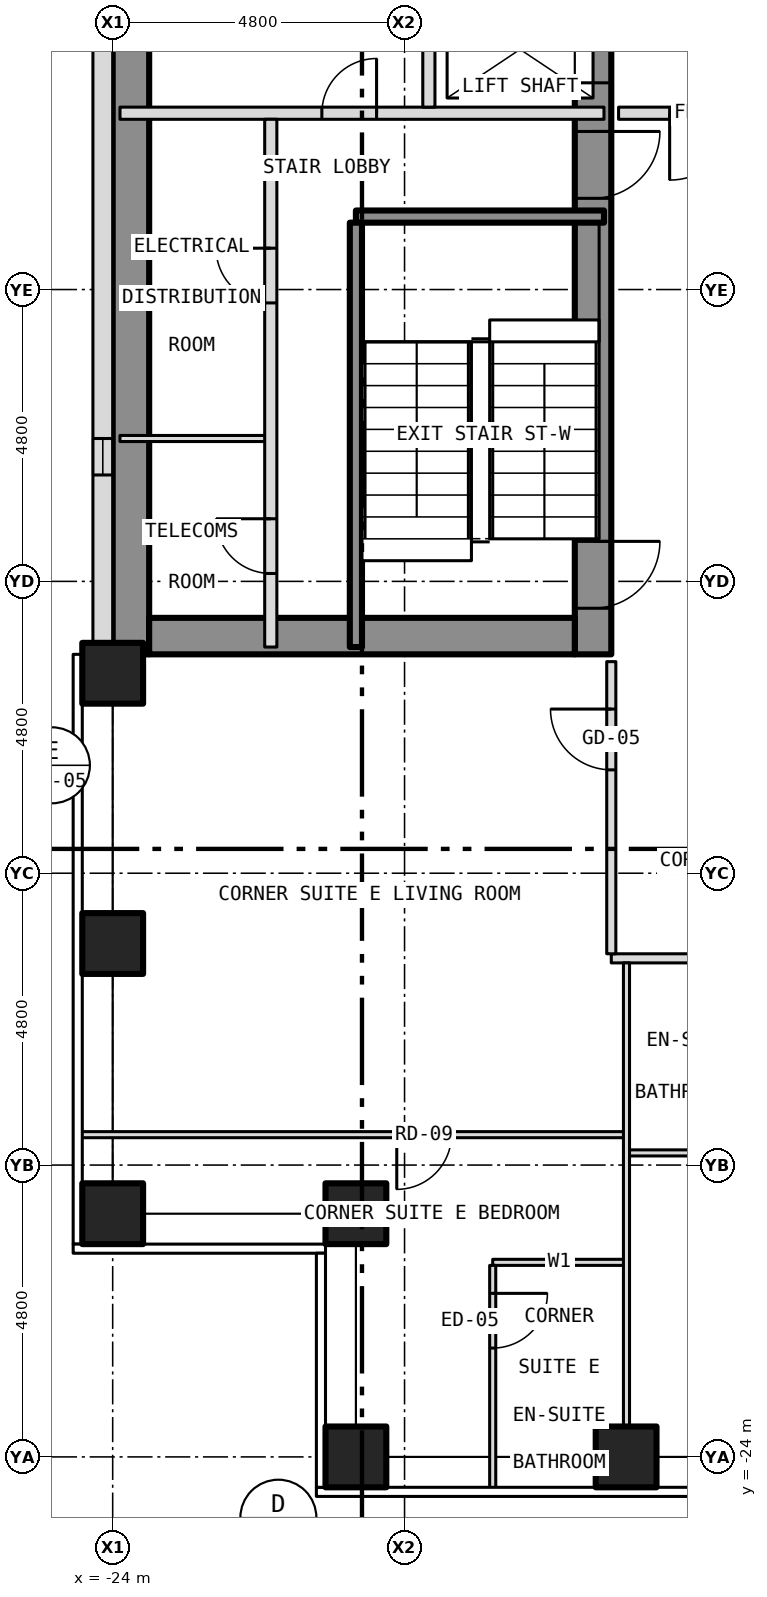
"""IFC4 building model, lengths in metres.
Left out: names, types, materials, properties, quantities, classifications, styles, units other than length and angle.
Written with IfcOpenShell. Run it as: python <this file> out.ifc"""

import sys

from ifc_helpers import new_model, si_unit, direction, frame, frame_2d, origin, origin_2d, place, context, subcontext, project, spatial, rectangle, hollow_rectangle, extrude, element, fill, save


model = new_model("IFC4")
c1 = context("Model", 3, precision=1e-05, world=origin(), true_north=direction((0.0, 1.0)))
c2 = subcontext(c1, "Body", "Model", "MODEL_VIEW")
j1 = project(units=[si_unit("LENGTHUNIT", "METRE"), si_unit("PLANEANGLEUNIT", "RADIAN")], contexts=[c1])
p1 = place(None, origin())
s1 = spatial("IfcSite", under=j1, at=p1, CompositionType="ELEMENT")
p2 = place(p1, origin())
s2 = spatial("IfcBuilding", under=s1, at=p2, CompositionType="ELEMENT")
p3 = place(p2, frame((0.0, 0.0, 81.0)))
s3 = spatial("IfcBuildingStorey", under=s2, at=p3, CompositionType="ELEMENT", Elevation=81.0)
for number, where, z_axis, x_axis in (
    (1, (-20.0, -24.0, -0.15), (0.0, 0.0, 1.0), (1.0, 0.0, 0.0)),
    (2, (-15.556, -24.0, -0.15), (0.0, 0.0, 1.0), (1.0, 0.0, 0.0)),
    (3, (-24.0, -20.0, -0.15), (0.0, 0.0, 1.0), (1.0, 0.0, 0.0)),
    (4, (-24.0, -15.556, -0.15), (0.0, 0.0, 1.0), (1.0, 0.0, 0.0)),
    (5, (-24.0, -11.111, -0.15), (0.0, 0.0, 1.0), (1.0, 0.0, 0.0)),
    (6, (-20.0, -20.0, -0.15), (0.0, 0.0, 1.0), (1.0, 0.0, 0.0)),
):
    element("IfcColumn", number, at=place(p3, frame(where, z_axis=z_axis, x_axis=x_axis)), inside=s3, PredefinedType="COLUMN", context=c2, shape_type="SweptSolid", body=[
        extrude(hollow_rectangle(XDim=1.0, YDim=1.0, WallThickness=0.06, at=origin_2d()), origin(), (0.0, 0.0, 1.0), 3.35),
    ])
p4 = place(p3, frame((-16.1, -10.8, 0.0), z_axis=(0.0, 0.0, 1.0), x_axis=(0.0, 1.0, 0.0)))
e7 = element("IfcWall", 7, at=p4, inside=s3, PredefinedType="SHEAR", context=c2, shape_type="SweptSolid", body=[
    extrude(rectangle(XDim=21.6, YDim=0.6, at=frame_2d((10.8, 0.0))), origin(), (0.0, 0.0, 1.0), 2.9),
])
p5 = place(p4, frame((9.4, 0.0, 0.0)))
e8 = element("IfcOpeningElement", 8, at=p5, cuts=e7, PredefinedType="OPENING", context=c2, shape_type="SweptSolid", body=[
    extrude(rectangle(XDim=1.1, YDim=2.1, at=frame_2d((0.55, 1.05))), frame((0.0, 0.312, 0.0), z_axis=(0.0, -1.0, 0.0), x_axis=(1.0, 0.0, 0.0)), (0.0, 0.0, 1.0), 0.624),
])
p6 = place(p4, frame((11.5, 0.0, 0.0)))
e9 = element("IfcOpeningElement", 9, at=p6, cuts=e7, PredefinedType="OPENING", context=c2, shape_type="SweptSolid", body=[
    extrude(rectangle(XDim=1.1, YDim=2.1, at=frame_2d((0.55, 1.05))), frame((0.0, 0.312, 0.0), z_axis=(0.0, -1.0, 0.0), x_axis=(1.0, 0.0, 0.0)), (0.0, 0.0, 1.0), 0.624),
])
p7 = place(p4, frame((13.6, 0.0, 0.0)))
e10 = element("IfcOpeningElement", 10, at=p7, cuts=e7, PredefinedType="OPENING", context=c2, shape_type="SweptSolid", body=[
    extrude(rectangle(XDim=1.1, YDim=2.1, at=frame_2d((0.55, 1.05))), frame((0.0, 0.312, 0.0), z_axis=(0.0, -1.0, 0.0), x_axis=(1.0, 0.0, 0.0)), (0.0, 0.0, 1.0), 0.624),
])
p8 = place(p4, frame((15.7, 0.0, 0.0)))
e11 = element("IfcOpeningElement", 11, at=p8, cuts=e7, PredefinedType="OPENING", context=c2, shape_type="SweptSolid", body=[
    extrude(rectangle(XDim=1.1, YDim=2.1, at=frame_2d((0.55, 1.05))), frame((0.0, 0.312, 0.0), z_axis=(0.0, -1.0, 0.0), x_axis=(1.0, 0.0, 0.0)), (0.0, 0.0, 1.0), 0.624),
])
p9 = place(p4, frame((17.8, 0.0, 0.0)))
e12 = element("IfcOpeningElement", 12, at=p9, cuts=e7, PredefinedType="OPENING", context=c2, shape_type="SweptSolid", body=[
    extrude(rectangle(XDim=1.1, YDim=2.1, at=frame_2d((0.55, 1.05))), frame((0.0, 0.312, 0.0), z_axis=(0.0, -1.0, 0.0), x_axis=(1.0, 0.0, 0.0)), (0.0, 0.0, 1.0), 0.624),
])
p10 = place(p4, frame((0.758, 0.0, 0.0)))
e13 = element("IfcOpeningElement", 13, at=p10, cuts=e7, PredefinedType="OPENING", context=c2, shape_type="SweptSolid", body=[
    extrude(rectangle(XDim=1.1, YDim=2.1, at=frame_2d((0.55, 1.05))), frame((0.0, 0.312, 0.0), z_axis=(0.0, -1.0, 0.0), x_axis=(1.0, 0.0, 0.0)), (0.0, 0.0, 1.0), 0.624),
])
p11 = place(p4, frame((7.5, 0.0, 0.0)))
e14 = element("IfcOpeningElement", 14, at=p11, cuts=e7, PredefinedType="OPENING", context=c2, shape_type="SweptSolid", body=[
    extrude(rectangle(XDim=1.1, YDim=2.1, at=frame_2d((0.55, 1.05))), frame((0.0, 0.312, 0.0), z_axis=(0.0, -1.0, 0.0), x_axis=(1.0, 0.0, 0.0)), (0.0, 0.0, 1.0), 0.624),
])
p12 = place(p3, frame((-23.7, -10.8, 0.0), z_axis=(0.0, 0.0, 1.0), x_axis=(0.0, 1.0, 0.0)))
e15 = element("IfcWall", 15, at=p12, inside=s3, PredefinedType="SHEAR", context=c2, shape_type="SweptSolid", body=[
    extrude(rectangle(XDim=21.6, YDim=0.6, at=frame_2d((10.8, 0.0))), origin(), (0.0, 0.0, 1.0), 2.9),
])
p13 = place(p3, frame((-23.4, -10.5, 0.0), z_axis=(0.0, 0.0, 1.0), x_axis=(1.0, 0.0, 0.0)))
e16 = element("IfcWall", 16, at=p13, inside=s3, PredefinedType="SHEAR", context=c2, shape_type="SweptSolid", body=[
    extrude(rectangle(XDim=7.0, YDim=0.6, at=frame_2d((3.5, 0.0))), origin(), (0.0, 0.0, 1.0), 2.9),
])
p14 = place(p3, frame((-24.163, 10.8, 0.0), z_axis=(0.0, 0.0, 1.0), x_axis=(0.0, -1.0, 0.0)))
e17 = element("IfcWall", 17, at=p14, inside=s3, PredefinedType="SOLIDWALL", context=c2, shape_type="SweptSolid", body=[
    extrude(rectangle(XDim=21.6, YDim=0.325, at=frame_2d((10.8, 0.0))), origin(), (0.0, 0.0, 1.0), 3.5),
])
p15 = place(p14, frame((18.05, 0.0, 1.0)))
e18 = element("IfcOpeningElement", 18, at=p15, cuts=e17, PredefinedType="OPENING", context=c2, shape_type="SweptSolid", body=[
    extrude(rectangle(XDim=0.6, YDim=1.5, at=frame_2d((0.3, 0.75))), frame((0.0, 0.175, 0.0), z_axis=(0.0, -1.0, 0.0), x_axis=(1.0, 0.0, 0.0)), (0.0, 0.0, 1.0), 0.349),
])
for number, where, z_axis, x_axis in (
    (19, (-17.75, -20.8, 0.0), (0.0, 0.0, 1.0), (1.0, 0.0, 0.0)),
    (20, (-15.55, -19.0, 0.0), (0.0, 0.0, 1.0), (1.0, 0.0, 0.0)),
):
    element("IfcWall", number, at=place(p3, frame(where, z_axis=z_axis, x_axis=x_axis)), inside=s3, PredefinedType="PARTITIONING", context=c2, shape_type="SweptSolid", body=[
        extrude(rectangle(XDim=2.2, YDim=0.1, at=frame_2d((1.1, 0.0))), origin(), (0.0, 0.0, 1.0), 3.2),
    ])
p16 = place(p3, frame((-24.53, -18.7, 0.0), z_axis=(0.0, 0.0, 1.0), x_axis=(1.0, 0.0, 0.0)))
e21 = element("IfcWall", 21, at=p16, inside=s3, PredefinedType="PARTITIONING", context=c2, shape_type="SweptSolid", body=[
    extrude(rectangle(XDim=8.98, YDim=0.1, at=frame_2d((4.49, 0.0))), origin(), (0.0, 0.0, 1.0), 3.2),
])
p17 = place(p16, frame((5.202, 0.0, 0.0)))
e22 = element("IfcOpeningElement", 22, at=p17, cuts=e21, PredefinedType="OPENING", context=c2, shape_type="SweptSolid", body=[
    extrude(rectangle(XDim=0.9, YDim=2.1, at=frame_2d((0.45, 1.05))), frame((0.0, 0.062, 0.0), z_axis=(0.0, -1.0, 0.0), x_axis=(1.0, 0.0, 0.0)), (0.0, 0.0, 1.0), 0.124),
])
p18 = place(p3, frame((-15.8, -15.8, 0.0), z_axis=(0.0, 0.0, 1.0), x_axis=(1.0, 0.0, 0.0)))
e23 = element("IfcWall", 23, at=p18, inside=s3, PredefinedType="PARTITIONING", context=c2, shape_type="SweptSolid", body=[
    extrude(rectangle(XDim=6.68, YDim=0.15, at=frame_2d((3.34, 0.0))), origin(), (0.0, 0.0, 1.0), 3.2),
])
p19 = place(p18, frame((4.047, 0.0, 0.0)))
e24 = element("IfcOpeningElement", 24, at=p19, cuts=e23, PredefinedType="OPENING", context=c2, shape_type="SweptSolid", body=[
    extrude(rectangle(XDim=1.0, YDim=2.1, at=frame_2d((0.5, 1.05))), frame((0.0, 0.087, 0.0), z_axis=(0.0, -1.0, 0.0), x_axis=(1.0, 0.0, 0.0)), (0.0, 0.0, 1.0), 0.174),
])
p20 = place(p3, frame((-23.88, -7.25, 0.0), z_axis=(0.0, 0.0, 1.0), x_axis=(1.0, 0.0, 0.0)))
e25 = element("IfcWall", 25, at=p20, inside=s3, PredefinedType="PARTITIONING", context=c2, shape_type="SweptSolid", body=[
    extrude(rectangle(XDim=2.48, YDim=0.1, at=frame_2d((1.24, 0.0))), origin(), (0.0, 0.0, 1.0), 2.9),
])
p21 = place(p3, frame((-20.0, -3.6, 0.0), z_axis=(0.0, 0.0, 1.0), x_axis=(1.0, 0.0, 0.0)))
e26 = element("IfcWall", 26, at=p21, inside=s3, PredefinedType="SHEAR", context=c2, shape_type="SweptSolid", body=[
    extrude(rectangle(XDim=4.08, YDim=0.2, at=frame_2d((2.04, 0.0))), origin(), (0.0, 0.0, 1.0), 2.9),
])
p22 = place(p3, frame((-23.88, -1.9, 0.0), z_axis=(0.0, 0.0, 1.0), x_axis=(1.0, 0.0, 0.0)))
e27 = element("IfcWall", 27, at=p22, inside=s3, PredefinedType="PARTITIONING", context=c2, shape_type="SweptSolid", body=[
    extrude(rectangle(XDim=7.96, YDim=0.2, at=frame_2d((3.98, 0.0))), origin(), (0.0, 0.0, 1.0), 2.9),
])
p23 = place(p22, frame((3.32, 0.0, 0.0)))
e28 = element("IfcOpeningElement", 28, at=p23, cuts=e27, PredefinedType="OPENING", context=c2, shape_type="SweptSolid", body=[
    extrude(rectangle(XDim=0.9, YDim=2.1, at=frame_2d((0.45, 1.05))), frame((0.0, 0.112, 0.0), z_axis=(0.0, -1.0, 0.0), x_axis=(1.0, 0.0, 0.0)), (0.0, 0.0, 1.0), 0.224),
])
p24 = place(p3, frame((-15.68, -1.9, 0.0), z_axis=(0.0, 0.0, 1.0), x_axis=(1.0, 0.0, 0.0)))
e29 = element("IfcWall", 29, at=p24, inside=s3, PredefinedType="PARTITIONING", context=c2, shape_type="SweptSolid", body=[
    extrude(rectangle(XDim=3.28, YDim=0.2, at=frame_2d((1.64, 0.0))), origin(), (0.0, 0.0, 1.0), 3.2),
])
p25 = place(p24, frame((0.84, 0.0, 0.0)))
e30 = element("IfcOpeningElement", 30, at=p25, cuts=e29, PredefinedType="OPENING", context=c2, shape_type="SweptSolid", body=[
    extrude(rectangle(XDim=1.1, YDim=2.1, at=frame_2d((0.55, 1.05))), frame((0.0, 0.112, 0.0), z_axis=(0.0, -1.0, 0.0), x_axis=(1.0, 0.0, 0.0)), (0.0, 0.0, 1.0), 0.224),
])
p26 = place(p3, frame((-21.4, -10.68, 0.0), z_axis=(0.0, 0.0, 1.0), x_axis=(0.0, 1.0, 0.0)))
e31 = element("IfcWall", 31, at=p26, inside=s3, PredefinedType="PARTITIONING", context=c2, shape_type="SweptSolid", body=[
    extrude(rectangle(XDim=8.68, YDim=0.2, at=frame_2d((4.34, 0.0))), origin(), (0.0, 0.0, 1.0), 2.9),
])
p27 = place(p26, frame((1.21, 0.0, 0.0)))
e32 = element("IfcOpeningElement", 32, at=p27, cuts=e31, PredefinedType="OPENING", context=c2, shape_type="SweptSolid", body=[
    extrude(rectangle(XDim=0.9, YDim=2.1, at=frame_2d((0.45, 1.05))), frame((0.0, 0.112, 0.0), z_axis=(0.0, -1.0, 0.0), x_axis=(1.0, 0.0, 0.0)), (0.0, 0.0, 1.0), 0.224),
])
p28 = place(p26, frame((5.66, 0.0, 0.0)))
e33 = element("IfcOpeningElement", 33, at=p28, cuts=e31, PredefinedType="OPENING", context=c2, shape_type="SweptSolid", body=[
    extrude(rectangle(XDim=0.9, YDim=2.1, at=frame_2d((0.45, 1.05))), frame((0.0, 0.112, 0.0), z_axis=(0.0, -1.0, 0.0), x_axis=(1.0, 0.0, 0.0)), (0.0, 0.0, 1.0), 0.224),
])
p29 = place(p3, frame((-20.0, -10.68, 0.0), z_axis=(0.0, 0.0, 1.0), x_axis=(0.0, 1.0, 0.0)))
e34 = element("IfcWall", 34, at=p29, inside=s3, PredefinedType="SHEAR", context=c2, shape_type="SweptSolid", body=[
    extrude(rectangle(XDim=6.98, YDim=0.2, at=frame_2d((3.49, 0.0))), origin(), (0.0, 0.0, 1.0), 2.9),
])
p30 = place(p3, frame((-18.8, -1.8, 0.0), z_axis=(0.0, 0.0, 1.0), x_axis=(0.0, 1.0, 0.0)))
e35 = element("IfcWall", 35, at=p30, inside=s3, PredefinedType="PARTITIONING", context=c2, shape_type="SweptSolid", body=[
    extrude(rectangle(XDim=12.48, YDim=0.2, at=frame_2d((6.24, 0.0))), origin(), (0.0, 0.0, 1.0), 2.9),
])
p31 = place(p3, frame((-17.75, -24.53, 0.0), z_axis=(0.0, 0.0, 1.0), x_axis=(0.0, 1.0, 0.0)))
e36 = element("IfcWall", 36, at=p31, inside=s3, PredefinedType="PARTITIONING", context=c2, shape_type="SweptSolid", body=[
    extrude(rectangle(XDim=3.68, YDim=0.1, at=frame_2d((1.84, 0.0))), origin(), (0.0, 0.0, 1.0), 3.2),
])
p32 = place(p31, frame((2.32, 0.0, 0.0)))
e37 = element("IfcOpeningElement", 37, at=p32, cuts=e36, PredefinedType="OPENING", context=c2, shape_type="SweptSolid", body=[
    extrude(rectangle(XDim=0.9, YDim=2.1, at=frame_2d((0.45, 1.05))), frame((0.0, 0.062, 0.0), z_axis=(0.0, -1.0, 0.0), x_axis=(1.0, 0.0, 0.0)), (0.0, 0.0, 1.0), 0.124),
])
p33 = place(p3, frame((-15.8, -15.725, 0.0), z_axis=(0.0, 0.0, 1.0), x_axis=(0.0, 1.0, 0.0)))
e38 = element("IfcWall", 38, at=p33, inside=s3, PredefinedType="PARTITIONING", context=c2, shape_type="SweptSolid", body=[
    extrude(rectangle(XDim=4.805, YDim=0.15, at=frame_2d((2.403, 0.0))), origin(), (0.0, 0.0, 1.0), 3.2),
])
p34 = place(p33, frame((3.025, 0.0, 0.0)))
e39 = element("IfcOpeningElement", 39, at=p34, cuts=e38, PredefinedType="OPENING", context=c2, shape_type="SweptSolid", body=[
    extrude(rectangle(XDim=1.0, YDim=2.1, at=frame_2d((0.5, 1.05))), frame((0.0, 0.087, 0.0), z_axis=(0.0, -1.0, 0.0), x_axis=(1.0, 0.0, 0.0)), (0.0, 0.0, 1.0), 0.174),
])
p35 = place(p3, frame((-15.55, -23.88, 0.0), z_axis=(0.0, 0.0, 1.0), x_axis=(0.0, 1.0, 0.0)))
e40 = element("IfcWall", 40, at=p35, inside=s3, PredefinedType="PARTITIONING", context=c2, shape_type="SweptSolid", body=[
    extrude(rectangle(XDim=8.005, YDim=0.1, at=frame_2d((4.002, 0.0))), origin(), (0.0, 0.0, 1.0), 3.2),
])
p36 = place(p15, origin())
e41 = element("IfcWindow", 41, at=p36, inside=s3, PartitioningType="SINGLE_PANEL", PredefinedType="WINDOW", context=c2, shape_type="SweptSolid", body=[
    extrude(rectangle(XDim=0.6, YDim=1.5, at=frame_2d((0.3, 0.75))), frame((0.0, -0.073, 0.0), z_axis=(0.0, -1.0, 0.0), x_axis=(1.0, 0.0, 0.0)), (0.0, 0.0, 1.0), 0.06),
])
fill(e18, e41)
p37 = place(p5, origin())
e42 = element("IfcDoor", 42, at=p37, inside=s3, OperationType="SLIDING_TO_LEFT", PredefinedType="DOOR", context=c2, shape_type="SweptSolid", body=[
    extrude(rectangle(XDim=1.1, YDim=2.1, at=frame_2d((0.55, 1.05))), frame((0.0, 0.025, 0.0), z_axis=(0.0, -1.0, 0.0), x_axis=(1.0, 0.0, 0.0)), (0.0, 0.0, 1.0), 0.05),
])
fill(e8, e42)
p38 = place(p10, origin())
e43 = element("IfcDoor", 43, at=p38, inside=s3, OperationType="SINGLE_SWING_RIGHT", PredefinedType="DOOR", context=c2, shape_type="SweptSolid", body=[
    extrude(rectangle(XDim=1.1, YDim=2.1, at=frame_2d((0.55, 1.05))), frame((0.0, 0.025, 0.0), z_axis=(0.0, -1.0, 0.0), x_axis=(1.0, 0.0, 0.0)), (0.0, 0.0, 1.0), 0.05),
])
fill(e13, e43)
p39 = place(p11, origin())
e44 = element("IfcDoor", 44, at=p39, inside=s3, OperationType="SINGLE_SWING_RIGHT", PredefinedType="DOOR", context=c2, shape_type="SweptSolid", body=[
    extrude(rectangle(XDim=1.1, YDim=2.1, at=frame_2d((0.55, 1.05))), frame((0.0, 0.025, 0.0), z_axis=(0.0, -1.0, 0.0), x_axis=(1.0, 0.0, 0.0)), (0.0, 0.0, 1.0), 0.05),
])
fill(e14, e44)
p40 = place(p27, origin())
e45 = element("IfcDoor", 45, at=p40, inside=s3, OperationType="SINGLE_SWING_RIGHT", PredefinedType="DOOR", context=c2, shape_type="SweptSolid", body=[
    extrude(rectangle(XDim=0.9, YDim=2.1, at=frame_2d((0.45, 1.05))), frame((0.0, 0.025, 0.0), z_axis=(0.0, -1.0, 0.0), x_axis=(1.0, 0.0, 0.0)), (0.0, 0.0, 1.0), 0.05),
])
fill(e32, e45)
p41 = place(p28, origin())
e46 = element("IfcDoor", 46, at=p41, inside=s3, OperationType="SINGLE_SWING_RIGHT", PredefinedType="DOOR", context=c2, shape_type="SweptSolid", body=[
    extrude(rectangle(XDim=0.9, YDim=2.1, at=frame_2d((0.45, 1.05))), frame((0.0, 0.025, 0.0), z_axis=(0.0, -1.0, 0.0), x_axis=(1.0, 0.0, 0.0)), (0.0, 0.0, 1.0), 0.05),
])
fill(e33, e46)
p42 = place(p23, origin())
e47 = element("IfcDoor", 47, at=p42, inside=s3, OperationType="SINGLE_SWING_RIGHT", PredefinedType="DOOR", context=c2, shape_type="SweptSolid", body=[
    extrude(rectangle(XDim=0.9, YDim=2.1, at=frame_2d((0.45, 1.05))), frame((0.0, 0.025, 0.0), z_axis=(0.0, -1.0, 0.0), x_axis=(1.0, 0.0, 0.0)), (0.0, 0.0, 1.0), 0.05),
])
fill(e28, e47)
p43 = place(p25, origin())
e48 = element("IfcDoor", 48, at=p43, inside=s3, OperationType="SINGLE_SWING_LEFT", PredefinedType="DOOR", context=c2, shape_type="SweptSolid", body=[
    extrude(rectangle(XDim=1.1, YDim=2.1, at=frame_2d((0.55, 1.05))), frame((0.0, 0.025, 0.0), z_axis=(0.0, -1.0, 0.0), x_axis=(1.0, 0.0, 0.0)), (0.0, 0.0, 1.0), 0.05),
])
fill(e30, e48)
p44 = place(p34, origin())
e49 = element("IfcDoor", 49, at=p44, inside=s3, OperationType="SINGLE_SWING_RIGHT", PredefinedType="DOOR", context=c2, shape_type="SweptSolid", body=[
    extrude(rectangle(XDim=1.0, YDim=2.1, at=frame_2d((0.5, 1.05))), frame((0.0, 0.025, 0.0), z_axis=(0.0, -1.0, 0.0), x_axis=(1.0, 0.0, 0.0)), (0.0, 0.0, 1.0), 0.05),
])
fill(e39, e49)
p45 = place(p17, origin())
e50 = element("IfcDoor", 50, at=p45, inside=s3, OperationType="SINGLE_SWING_LEFT", PredefinedType="DOOR", context=c2, shape_type="SweptSolid", body=[
    extrude(rectangle(XDim=0.9, YDim=2.1, at=frame_2d((0.45, 1.05))), frame((0.0, 0.025, 0.0), z_axis=(0.0, -1.0, 0.0), x_axis=(1.0, 0.0, 0.0)), (0.0, 0.0, 1.0), 0.05),
])
fill(e22, e50)
p46 = place(p32, origin())
e51 = element("IfcDoor", 51, at=p46, inside=s3, OperationType="SINGLE_SWING_RIGHT", PredefinedType="DOOR", context=c2, shape_type="SweptSolid", body=[
    extrude(rectangle(XDim=0.9, YDim=2.1, at=frame_2d((0.45, 1.05))), frame((0.0, 0.025, 0.0), z_axis=(0.0, -1.0, 0.0), x_axis=(1.0, 0.0, 0.0)), (0.0, 0.0, 1.0), 0.05),
])
fill(e37, e51)
save(model, sys.argv[1])
